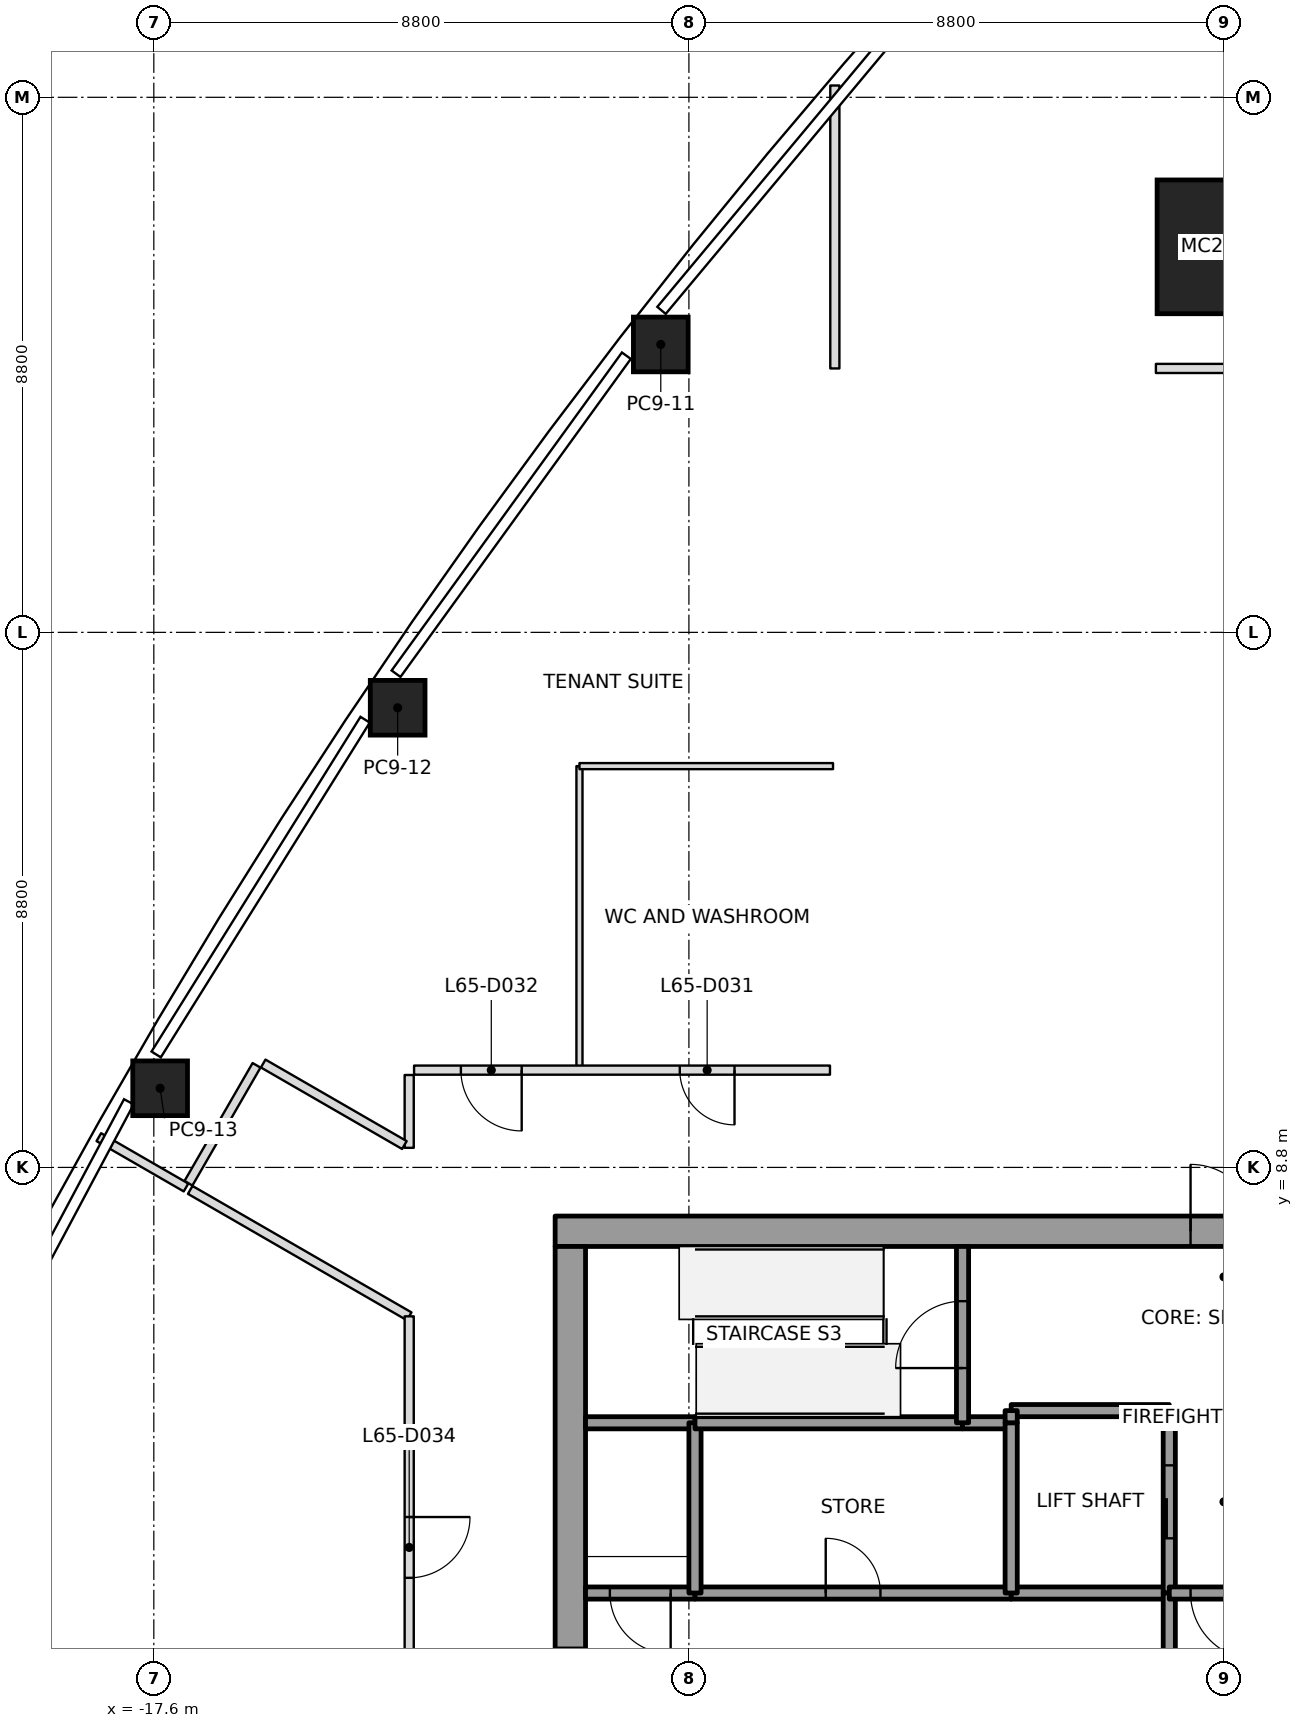
"""IFC4 building model, lengths in metres.
Left out: names, types, materials, properties, quantities, classifications, styles, units other than length and angle.
Written with IfcOpenShell. Run it as: python <this file> out.ifc"""

import sys

from ifc_helpers import new_model, si_unit, direction, frame, frame_2d, origin, origin_2d, place, context, subcontext, project, spatial, rectangle, extrude, element, fill, save


model = new_model("IFC4")
c1 = context("Model", 3, precision=1e-05, world=origin(), true_north=direction((0.0, 1.0)))
c2 = subcontext(c1, "Body", "Model", "MODEL_VIEW")
j1 = project(units=[si_unit("LENGTHUNIT", "METRE"), si_unit("PLANEANGLEUNIT", "RADIAN")], contexts=[c1])
p1 = place(None, origin())
s1 = spatial("IfcSite", under=j1, at=p1, CompositionType="ELEMENT")
p2 = place(p1, origin())
s2 = spatial("IfcBuilding", under=s1, at=p2, CompositionType="ELEMENT")
p3 = place(p2, frame((0.0, 0.0, 287.0)))
s3 = spatial("IfcBuildingStorey", under=s2, at=p3, CompositionType="ELEMENT", Elevation=287.0)
p4 = place(p3, frame((0.0, 23.941, 0.0), z_axis=(0.0, -0.032027018848, 0.999487003449), x_axis=(1.0, 0.0, 0.0)))
e1 = element("IfcColumn", 1, at=p4, inside=s3, PredefinedType="COLUMN", context=c2, shape_type="SweptSolid", body=[
    extrude(rectangle(XDim=2.2, YDim=2.2, at=origin_2d()), origin(), (0.0, 0.0, 1.0), 4.002),
])
p5 = place(p3, frame((-9.263, 22.335, 0.0), z_axis=(0.000244090207, -0.020320509722, 0.999793487329), x_axis=(0.614040008513, 0.789114959784, 0.01588861826)))
e2 = element("IfcColumn", 2, at=p5, inside=s3, PredefinedType="COLUMN", context=c2, shape_type="SweptSolid", body=[
    extrude(rectangle(XDim=0.9, YDim=0.9, at=origin_2d()), origin(), (0.0, 0.0, 1.0), 4.001),
])
p6 = place(p3, frame((-13.59, 16.36, 0.0), z_axis=(0.00530952661, -0.013121243922, 0.999899815924), x_axis=(0.558332488249, 0.829579461873, 0.007921426869)))
e3 = element("IfcColumn", 3, at=p6, inside=s3, PredefinedType="COLUMN", context=c2, shape_type="SweptSolid", body=[
    extrude(rectangle(XDim=0.9, YDim=0.9, at=origin_2d()), origin(), (0.0, 0.0, 1.0), 4.0),
])
p7 = place(p3, frame((-17.496, 10.101, 0.0), z_axis=(0.009887052741, -0.005675900648, 0.999935013058), x_axis=(0.49997556095, 0.866039512773, -2.7732311e-05)))
e4 = element("IfcColumn", 4, at=p7, inside=s3, PredefinedType="COLUMN", context=c2, shape_type="SweptSolid", body=[
    extrude(rectangle(XDim=0.9, YDim=0.9, at=origin_2d()), origin(), (0.0, 0.0, 1.0), 4.0),
])
p8 = place(p3, frame((-11.0, 7.75, 0.0), z_axis=(0.0, 0.0, 1.0), x_axis=(1.0, 0.0, 0.0)))
e5 = element("IfcWall", 5, at=p8, inside=s3, PredefinedType="SHEAR", context=c2, shape_type="SweptSolid", body=[
    extrude(rectangle(XDim=22.0, YDim=0.5, at=frame_2d((11.0, 0.0))), origin(), (0.0, 0.0, 1.0), 4.0),
])
p9 = place(p8, frame((10.45, 0.0, 0.0)))
e6 = element("IfcOpeningElement", 6, at=p9, cuts=e5, PredefinedType="OPENING", context=c2, shape_type="SweptSolid", body=[
    extrude(rectangle(XDim=1.1, YDim=2.1, at=frame_2d((0.55, 1.05))), frame((0.0, 0.25, 0.0), z_axis=(0.0, -1.0, 0.0), x_axis=(1.0, 0.0, 0.0)), (0.0, 0.0, 1.0), 0.5),
])
p10 = place(p3, frame((-10.75, -7.5, 0.0), z_axis=(0.0, 0.0, 1.0), x_axis=(0.0, 1.0, 0.0)))
e7 = element("IfcWall", 7, at=p10, inside=s3, PredefinedType="SHEAR", context=c2, shape_type="SweptSolid", body=[
    extrude(rectangle(XDim=15.0, YDim=0.5, at=frame_2d((7.5, 0.0))), origin(), (0.0, 0.0, 1.0), 4.0),
])
p11 = place(p10, frame((6.6, 0.0, 0.0)))
e8 = element("IfcOpeningElement", 8, at=p11, cuts=e7, PredefinedType="OPENING", context=c2, shape_type="SweptSolid", body=[
    extrude(rectangle(XDim=1.8, YDim=2.1, at=frame_2d((0.9, 1.05))), frame((0.0, 0.25, 0.0), z_axis=(0.0, -1.0, 0.0), x_axis=(1.0, 0.0, 0.0)), (0.0, 0.0, 1.0), 0.5),
])
p12 = place(p3, frame((-8.7, 1.8, 0.0), z_axis=(0.0, 0.0, 1.0), x_axis=(-1.0, 0.0, 0.0)))
e9 = element("IfcWall", 9, at=p12, inside=s3, PredefinedType="SOLIDWALL", context=c2, shape_type="SweptSolid", body=[
    extrude(rectangle(XDim=1.8, YDim=0.2, at=frame_2d((0.9, 0.0))), origin(), (0.0, 0.0, 1.0), 3.85),
])
p13 = place(p12, frame((0.4, 0.0, 0.0)))
e10 = element("IfcOpeningElement", 10, at=p13, cuts=e9, PredefinedType="OPENING", context=c2, shape_type="SweptSolid", body=[
    extrude(rectangle(XDim=1.0, YDim=2.1, at=frame_2d((0.5, 1.05))), frame((0.0, 0.1, 0.0), z_axis=(0.0, -1.0, 0.0), x_axis=(1.0, 0.0, 0.0)), (0.0, 0.0, 1.0), 0.2),
])
p14 = place(p3, frame((-8.7, 4.6, 0.0), z_axis=(0.0, 0.0, 1.0), x_axis=(-1.0, 0.0, 0.0)))
e11 = element("IfcWall", 11, at=p14, inside=s3, PredefinedType="SOLIDWALL", context=c2, shape_type="SweptSolid", body=[
    extrude(rectangle(XDim=1.8, YDim=0.2, at=frame_2d((0.9, 0.0))), origin(), (0.0, 0.0, 1.0), 3.85),
])
p15 = place(p3, frame((-8.7, 1.8, 0.0), z_axis=(0.0, 0.0, 1.0), x_axis=(1.0, 0.0, 0.0)))
e12 = element("IfcWall", 12, at=p15, inside=s3, PredefinedType="SOLIDWALL", context=c2, shape_type="SweptSolid", body=[
    extrude(rectangle(XDim=5.2, YDim=0.2, at=frame_2d((2.6, 0.0))), origin(), (0.0, 0.0, 1.0), 3.85),
])
p16 = place(p15, frame((2.15, 0.0, 0.0)))
e13 = element("IfcOpeningElement", 13, at=p16, cuts=e12, PredefinedType="OPENING", context=c2, shape_type="SweptSolid", body=[
    extrude(rectangle(XDim=0.9, YDim=2.1, at=frame_2d((0.45, 1.05))), frame((0.0, 0.1, 0.0), z_axis=(0.0, -1.0, 0.0), x_axis=(1.0, 0.0, 0.0)), (0.0, 0.0, 1.0), 0.2),
])
p17 = place(p3, frame((-8.7, 4.6, 0.0), z_axis=(0.0, 0.0, 1.0), x_axis=(0.0, -1.0, 0.0)))
e14 = element("IfcWall", 14, at=p17, inside=s3, PredefinedType="SOLIDWALL", context=c2, shape_type="SweptSolid", body=[
    extrude(rectangle(XDim=2.8, YDim=0.2, at=frame_2d((1.4, 0.0))), origin(), (0.0, 0.0, 1.0), 3.85),
])
p18 = place(p3, frame((-4.3, 4.6, 0.0), z_axis=(0.0, 0.0, 1.0), x_axis=(-1.0, 0.0, 0.0)))
e15 = element("IfcWall", 15, at=p18, inside=s3, PredefinedType="SOLIDWALL", context=c2, shape_type="SweptSolid", body=[
    extrude(rectangle(XDim=4.4, YDim=0.2, at=frame_2d((2.2, 0.0))), origin(), (0.0, 0.0, 1.0), 3.85),
])
p19 = place(p3, frame((-3.5, 4.6, 0.0), z_axis=(0.0, 0.0, 1.0), x_axis=(-1.0, 0.0, 0.0)))
e16 = element("IfcWall", 16, at=p19, inside=s3, PredefinedType="SOLIDWALL", context=c2, shape_type="SweptSolid", body=[
    extrude(rectangle(XDim=0.8, YDim=0.2, at=frame_2d((0.4, 0.0))), origin(), (0.0, 0.0, 1.0), 3.85),
])
p20 = place(p3, frame((-4.3, 4.6, 0.0), z_axis=(0.0, 0.0, 1.0), x_axis=(0.0, 1.0, 0.0)))
e17 = element("IfcWall", 17, at=p20, inside=s3, PredefinedType="SOLIDWALL", context=c2, shape_type="SweptSolid", body=[
    extrude(rectangle(XDim=2.9, YDim=0.2, at=frame_2d((1.45, 0.0))), origin(), (0.0, 0.0, 1.0), 3.85),
])
p21 = place(p20, frame((0.9, 0.0, 0.0)))
e18 = element("IfcOpeningElement", 18, at=p21, cuts=e17, PredefinedType="OPENING", context=c2, shape_type="SweptSolid", body=[
    extrude(rectangle(XDim=1.1, YDim=2.1, at=frame_2d((0.55, 1.05))), frame((0.0, 0.1, 0.0), z_axis=(0.0, -1.0, 0.0), x_axis=(1.0, 0.0, 0.0)), (0.0, 0.0, 1.0), 0.2),
])
p22 = place(p3, frame((-0.9, 1.8, 0.0), z_axis=(0.0, 0.0, 1.0), x_axis=(-1.0, 0.0, 0.0)))
e19 = element("IfcWall", 19, at=p22, inside=s3, PredefinedType="SOLIDWALL", context=c2, shape_type="SweptSolid", body=[
    extrude(rectangle(XDim=2.6, YDim=0.2, at=frame_2d((1.3, 0.0))), origin(), (0.0, 0.0, 1.0), 3.85),
])
p23 = place(p3, frame((-3.5, 1.8, 0.0), z_axis=(0.0, 0.0, 1.0), x_axis=(0.0, 1.0, 0.0)))
e20 = element("IfcWall", 20, at=p23, inside=s3, PredefinedType="SOLIDWALL", context=c2, shape_type="SweptSolid", body=[
    extrude(rectangle(XDim=2.8, YDim=0.2, at=frame_2d((1.4, 0.0))), origin(), (0.0, 0.0, 1.0), 3.85),
])
p24 = place(p3, frame((-0.9, 1.8, 0.0), z_axis=(0.0, 0.0, 1.0), x_axis=(0.0, 1.0, 0.0)))
e21 = element("IfcWall", 21, at=p24, inside=s3, PredefinedType="SOLIDWALL", context=c2, shape_type="SweptSolid", body=[
    extrude(rectangle(XDim=3.0, YDim=0.2, at=frame_2d((1.5, 0.0))), origin(), (0.0, 0.0, 1.0), 3.85),
])
p25 = place(p24, frame((0.9, 0.0, 0.0)))
e22 = element("IfcOpeningElement", 22, at=p25, cuts=e21, PredefinedType="OPENING", context=c2, shape_type="SweptSolid", body=[
    extrude(rectangle(XDim=1.2, YDim=2.1, at=frame_2d((0.6, 1.05))), frame((0.0, 0.1, 0.0), z_axis=(0.0, -1.0, 0.0), x_axis=(1.0, 0.0, 0.0)), (0.0, 0.0, 1.0), 0.2),
])
p26 = place(p3, frame((-0.9, 4.8, 0.0), z_axis=(0.0, 0.0, 1.0), x_axis=(-1.0, 0.0, 0.0)))
e23 = element("IfcWall", 23, at=p26, inside=s3, PredefinedType="SOLIDWALL", context=c2, shape_type="SweptSolid", body=[
    extrude(rectangle(XDim=2.6, YDim=0.2, at=frame_2d((1.3, 0.0))), origin(), (0.0, 0.0, 1.0), 3.85),
])
p27 = place(p3, frame((-3.5, 4.8, 0.0), z_axis=(0.0, 0.0, 1.0), x_axis=(0.0, -1.0, 0.0)))
e24 = element("IfcWall", 24, at=p27, inside=s3, PredefinedType="SOLIDWALL", context=c2, shape_type="SweptSolid", body=[
    extrude(rectangle(XDim=0.2, YDim=0.2, at=frame_2d((0.1, 0.0))), origin(), (0.0, 0.0, 1.0), 3.85),
])
p28 = place(p3, frame((-0.9, 1.8, 0.0), z_axis=(0.0, 0.0, 1.0), x_axis=(0.0, -1.0, 0.0)))
e25 = element("IfcWall", 25, at=p28, inside=s3, PredefinedType="SOLIDWALL", context=c2, shape_type="SweptSolid", body=[
    extrude(rectangle(XDim=3.6, YDim=0.2, at=frame_2d((1.8, 0.0))), origin(), (0.0, 0.0, 1.0), 3.85),
])
p29 = place(p28, frame((1.05, 0.0, 0.0)))
e26 = element("IfcOpeningElement", 26, at=p29, cuts=e25, PredefinedType="OPENING", context=c2, shape_type="SweptSolid", body=[
    extrude(rectangle(XDim=1.5, YDim=2.1, at=frame_2d((0.75, 1.05))), frame((0.0, 0.1, 0.0), z_axis=(0.0, -1.0, 0.0), x_axis=(1.0, 0.0, 0.0)), (0.0, 0.0, 1.0), 0.2),
])
p30 = place(p3, frame((0.9, 1.8, 0.0), z_axis=(0.0, 0.0, 1.0), x_axis=(-1.0, 0.0, 0.0)))
e27 = element("IfcWall", 27, at=p30, inside=s3, PredefinedType="SOLIDWALL", context=c2, shape_type="SweptSolid", body=[
    extrude(rectangle(XDim=1.8, YDim=0.2, at=frame_2d((0.9, 0.0))), origin(), (0.0, 0.0, 1.0), 3.85),
])
p31 = place(p30, frame((0.35, 0.0, 0.0)))
e28 = element("IfcOpeningElement", 28, at=p31, cuts=e27, PredefinedType="OPENING", context=c2, shape_type="SweptSolid", body=[
    extrude(rectangle(XDim=1.1, YDim=2.1, at=frame_2d((0.55, 1.05))), frame((0.0, 0.1, 0.0), z_axis=(0.0, -1.0, 0.0), x_axis=(1.0, 0.0, 0.0)), (0.0, 0.0, 1.0), 0.2),
])
p32 = place(p3, frame((-17.071, 8.47, 0.0), z_axis=(0.0, 0.0, 1.0), x_axis=(-0.866011236992, 0.500024536802, 0.0)))
e29 = element("IfcWall", 29, at=p32, inside=s3, PredefinedType="PARTITIONING", context=c2, shape_type="SweptSolid", body=[
    extrude(rectangle(XDim=1.656, YDim=0.15, at=frame_2d((0.828, 0.0))), origin(), (0.0, 0.0, 1.0), 3.234),
])
p33 = place(p3, frame((-6.4, 21.941, 0.0), z_axis=(0.0, 0.0, 1.0), x_axis=(0.0, 1.0, 0.0)))
e30 = element("IfcWall", 30, at=p33, inside=s3, PredefinedType="PARTITIONING", context=c2, shape_type="SweptSolid", body=[
    extrude(rectangle(XDim=4.653, YDim=0.15, at=frame_2d((2.327, 0.0))), origin(), (0.0, 0.0, 1.0), 3.234),
])
p34 = place(p3, frame((-17.001, 8.43, 0.0), z_axis=(0.0, 0.0, 1.0), x_axis=(0.866037957609, -0.499978255508, 0.0)))
e31 = element("IfcWall", 31, at=p34, inside=s3, PredefinedType="PARTITIONING", context=c2, shape_type="SweptSolid", body=[
    extrude(rectangle(XDim=4.158, YDim=0.15, at=frame_2d((2.079, 0.0))), origin(), (0.0, 0.0, 1.0), 3.3),
])
p35 = place(p3, frame((-13.4, 6.351, 0.0), z_axis=(0.0, 0.0, 1.0), x_axis=(0.0, -1.0, 0.0)))
e32 = element("IfcWall", 32, at=p35, inside=s3, PredefinedType="PARTITIONING", context=c2, shape_type="SweptSolid", body=[
    extrude(rectangle(XDim=12.702, YDim=0.15, at=frame_2d((6.351, 0.0))), origin(), (0.0, 0.0, 1.0), 3.3),
])
p36 = place(p35, frame((9.752, 0.0, 0.0)))
e33 = element("IfcOpeningElement", 33, at=p36, cuts=e32, PredefinedType="OPENING", context=c2, shape_type="SweptSolid", body=[
    extrude(rectangle(XDim=0.9, YDim=2.1, at=frame_2d((0.45, 1.05))), frame((0.0, 0.075, 0.0), z_axis=(0.0, -1.0, 0.0), x_axis=(1.0, 0.0, 0.0)), (0.0, 0.0, 1.0), 0.15),
])
p37 = place(p35, frame((3.301, 0.0, 0.0)))
e34 = element("IfcOpeningElement", 34, at=p37, cuts=e32, PredefinedType="OPENING", context=c2, shape_type="SweptSolid", body=[
    extrude(rectangle(XDim=1.0, YDim=2.1, at=frame_2d((0.5, 1.05))), frame((0.0, 0.075, 0.0), z_axis=(0.0, -1.0, 0.0), x_axis=(1.0, 0.0, 0.0)), (0.0, 0.0, 1.0), 0.15),
])
p38 = place(p3, frame((-15.91, 10.479, 0.0), z_axis=(0.0, 0.0, 1.0), x_axis=(-0.500030632641, -0.866007717299, 0.0)))
e35 = element("IfcWall", 35, at=p38, inside=s3, PredefinedType="PARTITIONING", context=c2, shape_type="SweptSolid", body=[
    extrude(rectangle(XDim=2.24, YDim=0.15, at=frame_2d((1.12, 0.0))), origin(), (0.0, 0.0, 1.0), 3.3),
])
p39 = place(p3, frame((-13.4, 10.32, 0.0), z_axis=(0.0, 0.0, 1.0), x_axis=(0.0, -1.0, 0.0)))
e36 = element("IfcWall", 36, at=p39, inside=s3, PredefinedType="PARTITIONING", context=c2, shape_type="SweptSolid", body=[
    extrude(rectangle(XDim=1.198, YDim=0.15, at=frame_2d((0.599, 0.0))), origin(), (0.0, 0.0, 1.0), 3.3),
])
p40 = place(p3, frame((-13.479, 9.168, 0.0), z_axis=(0.0, 0.0, 1.0), x_axis=(-0.866032438121, 0.499987815973, 0.0)))
e37 = element("IfcWall", 37, at=p40, inside=s3, PredefinedType="PARTITIONING", context=c2, shape_type="SweptSolid", body=[
    extrude(rectangle(XDim=2.681, YDim=0.15, at=frame_2d((1.341, 0.0))), origin(), (0.0, 0.0, 1.0), 3.3),
])
p41 = place(p3, frame((-6.48, 10.4, 0.0), z_axis=(0.0, 0.0, 1.0), x_axis=(-1.0, 0.0, 0.0)))
e38 = element("IfcWall", 38, at=p41, inside=s3, PredefinedType="PARTITIONING", context=c2, shape_type="SweptSolid", body=[
    extrude(rectangle(XDim=6.84, YDim=0.15, at=frame_2d((3.42, 0.0))), origin(), (0.0, 0.0, 1.0), 3.3),
])
p42 = place(p41, frame((1.57, 0.0, 0.0)))
e39 = element("IfcOpeningElement", 39, at=p42, cuts=e38, PredefinedType="OPENING", context=c2, shape_type="SweptSolid", body=[
    extrude(rectangle(XDim=0.9, YDim=2.1, at=frame_2d((0.45, 1.05))), frame((0.0, 0.075, 0.0), z_axis=(0.0, -1.0, 0.0), x_axis=(1.0, 0.0, 0.0)), (0.0, 0.0, 1.0), 0.15),
])
p43 = place(p41, frame((5.07, 0.0, 0.0)))
e40 = element("IfcOpeningElement", 40, at=p43, cuts=e38, PredefinedType="OPENING", context=c2, shape_type="SweptSolid", body=[
    extrude(rectangle(XDim=1.0, YDim=2.1, at=frame_2d((0.5, 1.05))), frame((0.0, 0.075, 0.0), z_axis=(0.0, -1.0, 0.0), x_axis=(1.0, 0.0, 0.0)), (0.0, 0.0, 1.0), 0.15),
])
p44 = place(p3, frame((1.12, 21.941, 0.0), z_axis=(0.0, 0.0, 1.0), x_axis=(-1.0, 0.0, 0.0)))
e41 = element("IfcWall", 41, at=p44, inside=s3, PredefinedType="PARTITIONING", context=c2, shape_type="SweptSolid", body=[
    extrude(rectangle(XDim=2.24, YDim=0.15, at=frame_2d((1.12, 0.0))), origin(), (0.0, 0.0, 1.0), 3.233),
])
p45 = place(p3, frame((-10.6, 10.43, 0.0), z_axis=(0.0, 0.0, 1.0), x_axis=(0.0, 1.0, 0.0)))
e42 = element("IfcWall", 42, at=p45, inside=s3, PredefinedType="PARTITIONING", context=c2, shape_type="SweptSolid", body=[
    extrude(rectangle(XDim=4.97, YDim=0.1, at=frame_2d((2.485, 0.0))), origin(), (0.0, 0.0, 1.0), 3.3),
])
p46 = place(p3, frame((-10.6, 15.4, 0.0), z_axis=(0.0, 0.0, 1.0), x_axis=(1.0, 0.0, 0.0)))
e43 = element("IfcWall", 43, at=p46, inside=s3, PredefinedType="PARTITIONING", context=c2, shape_type="SweptSolid", body=[
    extrude(rectangle(XDim=4.17, YDim=0.1, at=frame_2d((2.085, 0.0))), origin(), (0.0, 0.0, 1.0), 3.247),
])
p47 = place(p42, origin())
e44 = element("IfcDoor", 44, at=p47, inside=s3, OperationType="SINGLE_SWING_RIGHT", PredefinedType="DOOR", context=c2, shape_type="SweptSolid", body=[
    extrude(rectangle(XDim=0.9, YDim=2.1, at=frame_2d((0.45, 1.05))), frame((0.0, 0.025, 0.0), z_axis=(0.0, -1.0, 0.0), x_axis=(1.0, 0.0, 0.0)), (0.0, 0.0, 1.0), 0.05),
])
fill(e39, e44)
p48 = place(p43, origin())
e45 = element("IfcDoor", 45, at=p48, inside=s3, OperationType="SINGLE_SWING_RIGHT", PredefinedType="DOOR", context=c2, shape_type="SweptSolid", body=[
    extrude(rectangle(XDim=1.0, YDim=2.1, at=frame_2d((0.5, 1.05))), frame((0.0, 0.025, 0.0), z_axis=(0.0, -1.0, 0.0), x_axis=(1.0, 0.0, 0.0)), (0.0, 0.0, 1.0), 0.05),
])
fill(e40, e45)
p49 = place(p37, origin())
e46 = element("IfcDoor", 46, at=p49, inside=s3, OperationType="SINGLE_SWING_LEFT", PredefinedType="DOOR", context=c2, shape_type="SweptSolid", body=[
    extrude(rectangle(XDim=1.0, YDim=2.1, at=frame_2d((0.5, 1.05))), frame((0.0, 0.025, 0.0), z_axis=(0.0, -1.0, 0.0), x_axis=(1.0, 0.0, 0.0)), (0.0, 0.0, 1.0), 0.05),
])
fill(e34, e46)
p50 = place(p25, origin())
e47 = element("IfcDoor", 47, at=p50, inside=s3, OperationType="SLIDING_TO_RIGHT", PredefinedType="DOOR", context=c2, shape_type="SweptSolid", body=[
    extrude(rectangle(XDim=1.2, YDim=2.1, at=frame_2d((0.6, 1.05))), frame((0.0, 0.025, 0.0), z_axis=(0.0, -1.0, 0.0), x_axis=(1.0, 0.0, 0.0)), (0.0, 0.0, 1.0), 0.05),
])
fill(e22, e47)
p51 = place(p31, origin())
e48 = element("IfcDoor", 48, at=p51, inside=s3, OperationType="SINGLE_SWING_LEFT", PredefinedType="DOOR", context=c2, shape_type="SweptSolid", body=[
    extrude(rectangle(XDim=1.1, YDim=2.1, at=frame_2d((0.55, 1.05))), frame((0.0, 0.025, 0.0), z_axis=(0.0, -1.0, 0.0), x_axis=(1.0, 0.0, 0.0)), (0.0, 0.0, 1.0), 0.05),
])
fill(e28, e48)
p52 = place(p13, origin())
e49 = element("IfcDoor", 49, at=p52, inside=s3, OperationType="SINGLE_SWING_RIGHT", PredefinedType="DOOR", context=c2, shape_type="SweptSolid", body=[
    extrude(rectangle(XDim=1.0, YDim=2.1, at=frame_2d((0.5, 1.05))), frame((0.0, 0.025, 0.0), z_axis=(0.0, -1.0, 0.0), x_axis=(1.0, 0.0, 0.0)), (0.0, 0.0, 1.0), 0.05),
])
fill(e10, e49)
p53 = place(p21, origin())
e50 = element("IfcDoor", 50, at=p53, inside=s3, OperationType="SINGLE_SWING_LEFT", PredefinedType="DOOR", context=c2, shape_type="SweptSolid", body=[
    extrude(rectangle(XDim=1.1, YDim=2.1, at=frame_2d((0.55, 1.05))), frame((0.0, 0.025, 0.0), z_axis=(0.0, -1.0, 0.0), x_axis=(1.0, 0.0, 0.0)), (0.0, 0.0, 1.0), 0.05),
])
fill(e18, e50)
p54 = place(p16, origin())
e51 = element("IfcDoor", 51, at=p54, inside=s3, OperationType="SINGLE_SWING_LEFT", PredefinedType="DOOR", context=c2, shape_type="SweptSolid", body=[
    extrude(rectangle(XDim=0.9, YDim=2.1, at=frame_2d((0.45, 1.05))), frame((0.0, 0.025, 0.0), z_axis=(0.0, -1.0, 0.0), x_axis=(1.0, 0.0, 0.0)), (0.0, 0.0, 1.0), 0.05),
])
fill(e13, e51)
p55 = place(p11, origin())
e52 = element("IfcDoor", 52, at=p55, inside=s3, OperationType="DOUBLE_DOOR_SINGLE_SWING", PredefinedType="DOOR", context=c2, shape_type="SweptSolid", body=[
    extrude(rectangle(XDim=1.8, YDim=2.1, at=frame_2d((0.9, 1.05))), frame((0.0, 0.025, 0.0), z_axis=(0.0, -1.0, 0.0), x_axis=(1.0, 0.0, 0.0)), (0.0, 0.0, 1.0), 0.05),
])
fill(e8, e52)
p56 = place(p9, origin())
e53 = element("IfcDoor", 53, at=p56, inside=s3, OperationType="SINGLE_SWING_RIGHT", PredefinedType="DOOR", context=c2, shape_type="SweptSolid", body=[
    extrude(rectangle(XDim=1.1, YDim=2.1, at=frame_2d((0.55, 1.05))), frame((0.0, 0.025, 0.0), z_axis=(0.0, -1.0, 0.0), x_axis=(1.0, 0.0, 0.0)), (0.0, 0.0, 1.0), 0.05),
])
fill(e6, e53)
save(model, sys.argv[1])
